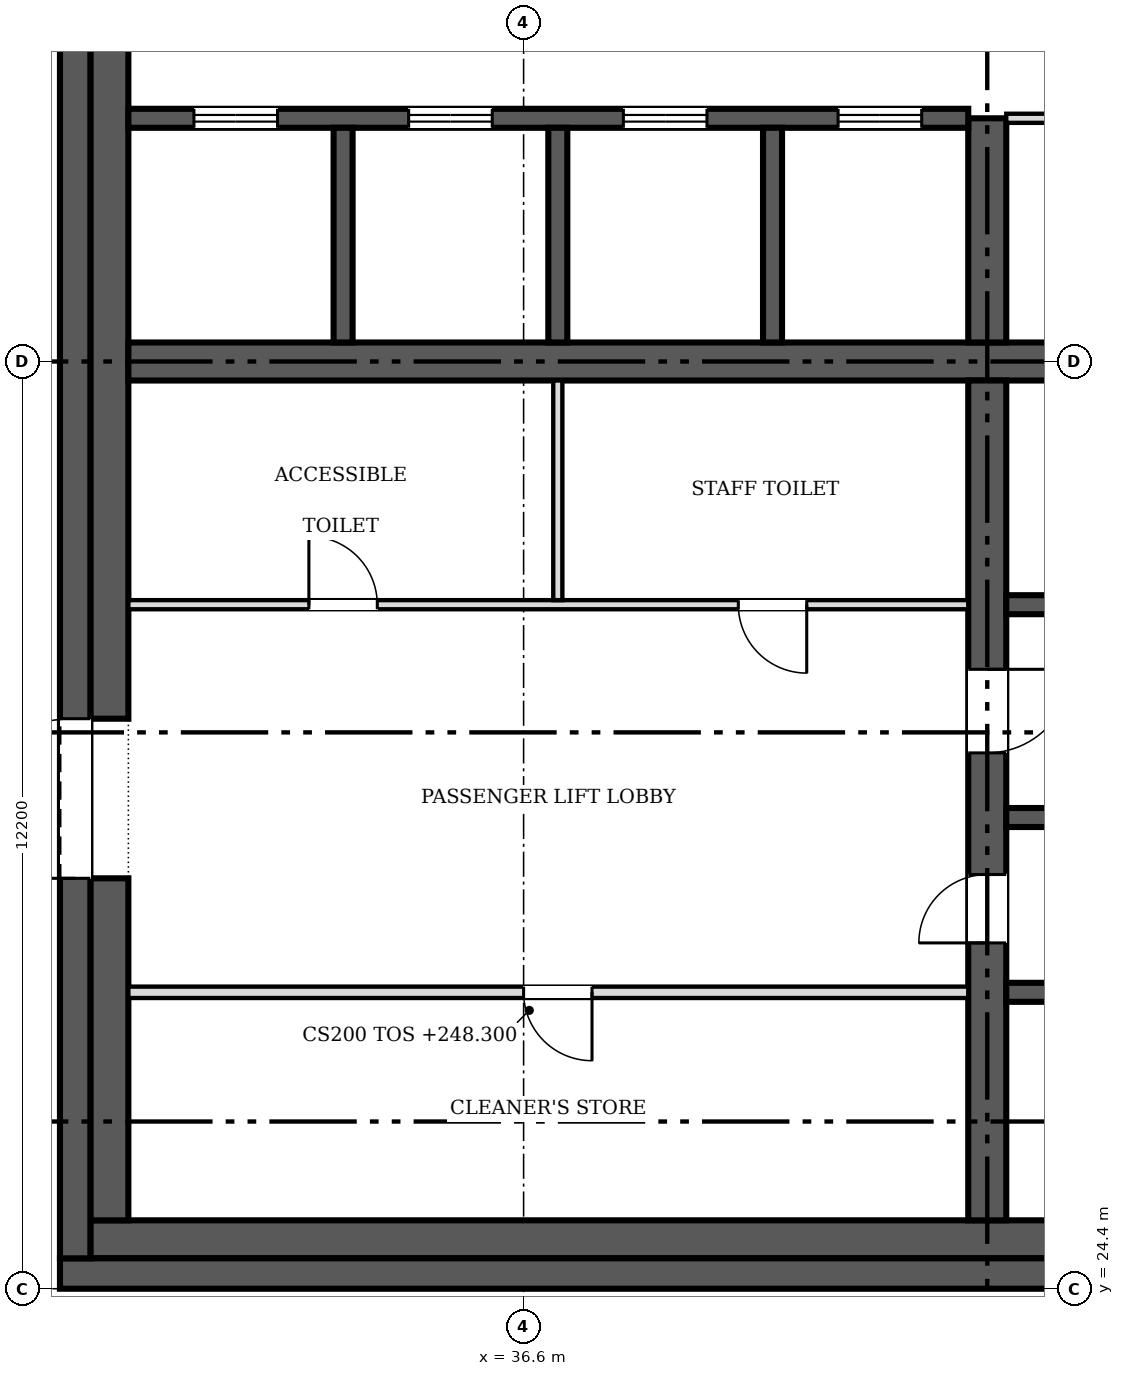
"""IFC4 building model, lengths in metres.
Left out: names, types, materials, properties, quantities, classifications, styles, units other than length and angle.
Written with IfcOpenShell. Run it as: python <this file> out.ifc"""

import sys

from ifc_helpers import new_model, si_unit, direction, frame, frame_2d, origin, place, context, subcontext, project, spatial, rectangle, extrude, source, transform, mapped, element, fill, save


model = new_model("IFC4")
c1 = context("Model", 3, precision=1e-05, world=origin(), true_north=direction((0.0, 1.0)))
c2 = subcontext(c1, "Body", "Model", "MODEL_VIEW")
j1 = project(units=[si_unit("LENGTHUNIT", "METRE"), si_unit("PLANEANGLEUNIT", "RADIAN")], contexts=[c1])
p1 = place(None, origin())
s1 = spatial("IfcSite", under=j1, at=p1, CompositionType="ELEMENT")
p2 = place(p1, origin())
s2 = spatial("IfcBuilding", under=s1, at=p2, CompositionType="ELEMENT")
p3 = place(p2, frame((0.0, 0.0, 248.3)))
s3 = spatial("IfcBuildingStorey", under=s2, at=p3, CompositionType="ELEMENT", Elevation=248.3)
p4 = place(p3, frame((54.9, 24.6, 0.0), z_axis=(0.0, 0.0, 1.0), x_axis=(-1.0, 0.0, 0.0)))
e1 = element("IfcWall", 1, at=p4, inside=s3, PredefinedType="SHEAR", context=c2, shape_type="SweptSolid", body=[
    extrude(rectangle(XDim=24.4, YDim=0.4, at=frame_2d((12.2, 0.0))), origin(), (0.0, 0.0, 1.0), 3.8),
])
m1 = source(origin(), c2, "Body", "SweptSolid", [
    extrude(rectangle(XDim=1.2, YDim=2.1, at=frame_2d((0.6, 1.05))), frame((0.0, 0.21, 0.0), z_axis=(0.0, -1.0, 0.0), x_axis=(1.0, 0.0, 0.0)), (0.0, 0.0, 1.0), 0.42),
])
p5 = place(p4, frame((1.5, 0.0, 0.0)))
e2 = element("IfcOpeningElement", 2, at=p5, cuts=e1, PredefinedType="OPENING", context=c2, shape_type="MappedRepresentation", body=[
    mapped(m1, transform((0.0, 0.0, 0.0), scale=1.0)),
])
p6 = place(p3, frame((30.7, 24.8, 0.0), z_axis=(0.0, 0.0, 1.0), x_axis=(0.0, 1.0, 0.0)))
e3 = element("IfcWall", 3, at=p6, inside=s3, PredefinedType="SHEAR", context=c2, shape_type="SweptSolid", body=[
    extrude(rectangle(XDim=23.6, YDim=0.4, at=frame_2d((11.8, 0.0))), origin(), (0.0, 0.0, 1.0), 3.8),
])
m2 = source(origin(), c2, "Body", "SweptSolid", [
    extrude(rectangle(XDim=2.1, YDim=2.4, at=frame_2d((1.05, 1.2))), frame((0.0, 0.21, 0.0), z_axis=(0.0, -1.0, 0.0), x_axis=(1.0, 0.0, 0.0)), (0.0, 0.0, 1.0), 0.42),
])
p7 = place(p6, frame((5.0, 0.0, 0.0)))
e4 = element("IfcOpeningElement", 4, at=p7, cuts=e3, PredefinedType="OPENING", context=c2, shape_type="MappedRepresentation", body=[
    mapped(m2, transform((0.0, 0.0, 0.0), scale=1.0)),
])
p8 = place(p6, frame((16.5, 0.0, 0.0)))
e5 = element("IfcOpeningElement", 5, at=p8, cuts=e3, PredefinedType="OPENING", context=c2, shape_type="MappedRepresentation", body=[
    mapped(m2, transform((0.0, 0.0, 0.0), scale=1.0)),
])
p9 = place(p3, frame((30.9, 25.05, 0.0), z_axis=(0.0, 0.0, 1.0), x_axis=(1.0, 0.0, 0.0)))
e6 = element("IfcWall", 6, at=p9, inside=s3, PredefinedType="SOLIDWALL", context=c2, shape_type="SweptSolid", body=[
    extrude(rectangle(XDim=21.3, YDim=0.5, at=frame_2d((10.65, 0.0))), origin(), (0.0, 0.0, 1.0), 3.8),
])
p10 = place(p3, frame((31.15, 25.3, 0.0), z_axis=(0.0, 0.0, 1.0), x_axis=(0.0, 1.0, 0.0)))
e7 = element("IfcWall", 7, at=p10, inside=s3, PredefinedType="SOLIDWALL", context=c2, shape_type="SweptSolid", body=[
    extrude(rectangle(XDim=4.5, YDim=0.5, at=frame_2d((2.25, 0.0))), origin(), (0.0, 0.0, 1.0), 3.8),
])
p11 = place(p3, frame((31.15, 31.9, 0.0), z_axis=(0.0, 0.0, 1.0), x_axis=(0.0, 1.0, 0.0)))
e8 = element("IfcWall", 8, at=p11, inside=s3, PredefinedType="SOLIDWALL", context=c2, shape_type="SweptSolid", body=[
    extrude(rectangle(XDim=9.4, YDim=0.5, at=frame_2d((4.7, 0.0))), origin(), (0.0, 0.0, 1.0), 3.8),
])
p12 = place(p3, frame((31.4, 36.6, 0.0), z_axis=(0.0, 0.0, 1.0), x_axis=(1.0, 0.0, 0.0)))
e9 = element("IfcWall", 9, at=p12, inside=s3, PredefinedType="SHEAR", context=c2, shape_type="SweptSolid", body=[
    extrude(rectangle(XDim=16.95, YDim=0.5, at=frame_2d((8.475, 0.0))), origin(), (0.0, 0.0, 1.0), 3.8),
])
p13 = place(p3, frame((42.7, 36.35, 0.0), z_axis=(0.0, 0.0, 1.0), x_axis=(0.0, -1.0, 0.0)))
e10 = element("IfcWall", 10, at=p13, inside=s3, PredefinedType="SHEAR", context=c2, shape_type="SweptSolid", body=[
    extrude(rectangle(XDim=11.05, YDim=0.5, at=frame_2d((5.525, 0.0))), origin(), (0.0, 0.0, 1.0), 3.8),
])
m3 = source(origin(), c2, "Body", "SweptSolid", [
    extrude(rectangle(XDim=0.9, YDim=2.1, at=frame_2d((0.45, 1.05))), frame((0.0, 0.26, 0.0), z_axis=(0.0, -1.0, 0.0), x_axis=(1.0, 0.0, 0.0)), (0.0, 0.0, 1.0), 0.52),
])
p14 = place(p13, frame((6.5, 0.0, 0.0)))
e11 = element("IfcOpeningElement", 11, at=p14, cuts=e10, PredefinedType="OPENING", context=c2, shape_type="MappedRepresentation", body=[
    mapped(m3, transform((0.0, 0.0, 0.0), scale=1.0)),
])
m4 = source(origin(), c2, "Body", "SweptSolid", [
    extrude(rectangle(XDim=1.1, YDim=2.1, at=frame_2d((0.55, 1.05))), frame((0.0, 0.26, 0.0), z_axis=(0.0, -1.0, 0.0), x_axis=(1.0, 0.0, 0.0)), (0.0, 0.0, 1.0), 0.52),
])
p15 = place(p13, frame((3.8, 0.0, 0.0)))
e12 = element("IfcOpeningElement", 12, at=p15, cuts=e10, PredefinedType="OPENING", context=c2, shape_type="MappedRepresentation", body=[
    mapped(m4, transform((0.0, 0.0, 0.0), scale=1.0)),
])
p16 = place(p3, frame((42.7, 36.85, 0.0), z_axis=(0.0, 0.0, 1.0), x_axis=(0.0, 1.0, 0.0)))
e13 = element("IfcWall", 13, at=p16, inside=s3, PredefinedType="SHEAR", context=c2, shape_type="SweptSolid", body=[
    extrude(rectangle(XDim=2.95, YDim=0.5, at=frame_2d((1.475, 0.0))), origin(), (0.0, 0.0, 1.0), 3.8),
])
p17 = place(p3, frame((31.4, 39.8, 0.0), z_axis=(0.0, 0.0, 1.0), x_axis=(1.0, 0.0, 0.0)))
e14 = element("IfcWall", 14, at=p17, inside=s3, PredefinedType="SOLIDWALL", context=c2, shape_type="SweptSolid", body=[
    extrude(rectangle(XDim=11.05, YDim=0.25, at=frame_2d((5.525, 0.0))), origin(), (0.0, 0.0, 1.0), 3.8),
])
m5 = source(origin(), c2, "Body", "SweptSolid", [
    extrude(rectangle(XDim=1.1, YDim=2.1, at=frame_2d((0.55, 1.05))), frame((0.0, 0.135, 0.0), z_axis=(0.0, -1.0, 0.0), x_axis=(1.0, 0.0, 0.0)), (0.0, 0.0, 1.0), 0.27),
])
p18 = place(p17, frame((0.863, 0.0, 0.0)))
e15 = element("IfcOpeningElement", 15, at=p18, cuts=e14, PredefinedType="OPENING", context=c2, shape_type="MappedRepresentation", body=[
    mapped(m5, transform((0.0, 0.0, 0.0), scale=1.0)),
])
p19 = place(p17, frame((3.688, 0.0, 0.0)))
e16 = element("IfcOpeningElement", 16, at=p19, cuts=e14, PredefinedType="OPENING", context=c2, shape_type="MappedRepresentation", body=[
    mapped(m5, transform((0.0, 0.0, 0.0), scale=1.0)),
])
p20 = place(p17, frame((6.512, 0.0, 0.0)))
e17 = element("IfcOpeningElement", 17, at=p20, cuts=e14, PredefinedType="OPENING", context=c2, shape_type="MappedRepresentation", body=[
    mapped(m5, transform((0.0, 0.0, 0.0), scale=1.0)),
])
p21 = place(p17, frame((9.337, 0.0, 0.0)))
e18 = element("IfcOpeningElement", 18, at=p21, cuts=e14, PredefinedType="OPENING", context=c2, shape_type="MappedRepresentation", body=[
    mapped(m5, transform((0.0, 0.0, 0.0), scale=1.0)),
])
p22 = place(p3, frame((48.225, 33.4, 0.0), z_axis=(0.0, 0.0, 1.0), x_axis=(-1.0, 0.0, 0.0)))
e19 = element("IfcWall", 19, at=p22, inside=s3, PredefinedType="SOLIDWALL", context=c2, shape_type="SweptSolid", body=[
    extrude(rectangle(XDim=5.275, YDim=0.25, at=frame_2d((2.638, 0.0))), origin(), (0.0, 0.0, 1.0), 3.8),
])
m6 = source(origin(), c2, "Body", "SweptSolid", [
    extrude(rectangle(XDim=1.2, YDim=2.1, at=frame_2d((0.6, 1.05))), frame((0.0, 0.135, 0.0), z_axis=(0.0, -1.0, 0.0), x_axis=(1.0, 0.0, 0.0)), (0.0, 0.0, 1.0), 0.27),
])
p23 = place(p22, frame((3.512, 0.0, 0.0)))
e20 = element("IfcOpeningElement", 20, at=p23, cuts=e19, PredefinedType="OPENING", context=c2, shape_type="MappedRepresentation", body=[
    mapped(m6, transform((0.0, 0.0, 0.0), scale=1.0)),
])
p24 = place(p22, frame((0.688, 0.0, 0.0)))
e21 = element("IfcOpeningElement", 21, at=p24, cuts=e19, PredefinedType="OPENING", context=c2, shape_type="MappedRepresentation", body=[
    mapped(m6, transform((0.0, 0.0, 0.0), scale=1.0)),
])
for number, where, z_axis, x_axis in (
    (22, (42.95, 28.3, 0.0), (0.0, 0.0, 1.0), (1.0, 0.0, 0.0)),
    (23, (42.95, 30.6, 0.0), (0.0, 0.0, 1.0), (1.0, 0.0, 0.0)),
):
    element("IfcWall", number, at=place(p3, frame(where, z_axis=z_axis, x_axis=x_axis)), inside=s3, PredefinedType="SOLIDWALL", context=c2, shape_type="SweptSolid", body=[
        extrude(rectangle(XDim=5.275, YDim=0.25, at=frame_2d((2.638, 0.0))), origin(), (0.0, 0.0, 1.0), 3.8),
    ])
for number, where, z_axis, x_axis in (
    (24, (34.225, 36.85, 0.0), (0.0, 0.0, 1.0), (0.0, 1.0, 0.0)),
    (25, (37.05, 36.85, 0.0), (0.0, 0.0, 1.0), (0.0, 1.0, 0.0)),
    (26, (39.875, 36.85, 0.0), (0.0, 0.0, 1.0), (0.0, 1.0, 0.0)),
):
    element("IfcWall", number, at=place(p3, frame(where, z_axis=z_axis, x_axis=x_axis)), inside=s3, PredefinedType="SOLIDWALL", context=c2, shape_type="SweptSolid", body=[
        extrude(rectangle(XDim=2.825, YDim=0.25, at=frame_2d((1.413, 0.0))), origin(), (0.0, 0.0, 1.0), 3.8),
    ])
p25 = place(p3, frame((42.45, 28.3, 0.0), z_axis=(0.0, 0.0, 1.0), x_axis=(-1.0, 0.0, 0.0)))
e27 = element("IfcWall", 27, at=p25, inside=s3, PredefinedType="PARTITIONING", context=c2, shape_type="SweptSolid", body=[
    extrude(rectangle(XDim=11.05, YDim=0.15, at=frame_2d((5.525, 0.0))), origin(), (0.0, 0.0, 1.0), 3.6),
])
m7 = source(origin(), c2, "Body", "SweptSolid", [
    extrude(rectangle(XDim=0.9, YDim=2.1, at=frame_2d((0.45, 1.05))), frame((0.0, 0.085, 0.0), z_axis=(0.0, -1.0, 0.0), x_axis=(1.0, 0.0, 0.0)), (0.0, 0.0, 1.0), 0.17),
])
p26 = place(p25, frame((4.95, 0.0, 0.0)))
e28 = element("IfcOpeningElement", 28, at=p26, cuts=e27, PredefinedType="OPENING", context=c2, shape_type="MappedRepresentation", body=[
    mapped(m7, transform((0.0, 0.0, 0.0), scale=1.0)),
])
p27 = place(p3, frame((31.4, 33.4, 0.0), z_axis=(0.0, 0.0, 1.0), x_axis=(1.0, 0.0, 0.0)))
e29 = element("IfcWall", 29, at=p27, inside=s3, PredefinedType="PARTITIONING", context=c2, shape_type="SweptSolid", body=[
    extrude(rectangle(XDim=11.05, YDim=0.12, at=frame_2d((5.525, 0.0))), origin(), (0.0, 0.0, 1.0), 3.6),
])
m8 = source(origin(), c2, "Body", "SweptSolid", [
    extrude(rectangle(XDim=0.9, YDim=2.1, at=frame_2d((0.45, 1.05))), frame((0.0, 0.07, 0.0), z_axis=(0.0, -1.0, 0.0), x_axis=(1.0, 0.0, 0.0)), (0.0, 0.0, 1.0), 0.14),
])
p28 = place(p27, frame((2.375, 0.0, 0.0)))
e30 = element("IfcOpeningElement", 30, at=p28, cuts=e29, PredefinedType="OPENING", context=c2, shape_type="MappedRepresentation", body=[
    mapped(m8, transform((0.0, 0.0, 0.0), scale=1.0)),
])
p29 = place(p27, frame((8.025, 0.0, 0.0)))
e31 = element("IfcOpeningElement", 31, at=p29, cuts=e29, PredefinedType="OPENING", context=c2, shape_type="MappedRepresentation", body=[
    mapped(m8, transform((0.0, 0.0, 0.0), scale=1.0)),
])
p30 = place(p3, frame((48.225, 39.8, 0.0), z_axis=(0.0, 0.0, 1.0), x_axis=(-1.0, 0.0, 0.0)))
e32 = element("IfcWall", 32, at=p30, inside=s3, PredefinedType="PARTITIONING", context=c2, shape_type="SweptSolid", body=[
    extrude(rectangle(XDim=5.275, YDim=0.12, at=frame_2d((2.638, 0.0))), origin(), (0.0, 0.0, 1.0), 3.6),
])
p31 = place(p30, frame((3.663, 0.0, 0.0)))
e33 = element("IfcOpeningElement", 33, at=p31, cuts=e32, PredefinedType="OPENING", context=c2, shape_type="MappedRepresentation", body=[
    mapped(m8, transform((0.0, 0.0, 0.0), scale=1.0)),
])
p32 = place(p30, frame((0.837, 0.0, 0.0)))
e34 = element("IfcOpeningElement", 34, at=p32, cuts=e32, PredefinedType="OPENING", context=c2, shape_type="MappedRepresentation", body=[
    mapped(m8, transform((0.0, 0.0, 0.0), scale=1.0)),
])
p33 = place(p3, frame((37.05, 33.46, 0.0), z_axis=(0.0, 0.0, 1.0), x_axis=(0.0, 1.0, 0.0)))
e35 = element("IfcWall", 35, at=p33, inside=s3, PredefinedType="PARTITIONING", context=c2, shape_type="SweptSolid", body=[
    extrude(rectangle(XDim=2.89, YDim=0.12, at=frame_2d((1.445, 0.0))), origin(), (0.0, 0.0, 1.0), 3.6),
])
m9 = source(origin(), c2, "Body", "SweptSolid", [
    extrude(rectangle(XDim=2.1, YDim=2.4, at=frame_2d((1.05, 1.2))), frame((0.0, 0.025, 0.0), z_axis=(0.0, -1.0, 0.0), x_axis=(1.0, 0.0, 0.0)), (0.0, 0.0, 1.0), 0.05),
])
p34 = place(p7, origin())
e36 = element("IfcDoor", 36, at=p34, inside=s3, OperationType="DOUBLE_DOOR_SINGLE_SWING", PredefinedType="DOOR", context=c2, shape_type="MappedRepresentation", body=[
    mapped(m9, transform((0.0, 0.0, 0.0), scale=1.0)),
])
fill(e4, e36)
m10 = source(origin(), c2, "Body", "SweptSolid", [
    extrude(rectangle(XDim=0.9, YDim=2.1, at=frame_2d((0.45, 1.05))), frame((0.0, 0.025, 0.0), z_axis=(0.0, -1.0, 0.0), x_axis=(1.0, 0.0, 0.0)), (0.0, 0.0, 1.0), 0.05),
])
p35 = place(p14, origin())
e37 = element("IfcDoor", 37, at=p35, inside=s3, OperationType="SINGLE_SWING_RIGHT", PredefinedType="DOOR", context=c2, shape_type="MappedRepresentation", body=[
    mapped(m10, transform((0.0, 0.0, 0.0), scale=1.0)),
])
fill(e11, e37)
m11 = source(origin(), c2, "Body", "SweptSolid", [
    extrude(rectangle(XDim=1.1, YDim=2.1, at=frame_2d((0.55, 1.05))), frame((0.0, 0.025, 0.0), z_axis=(0.0, -1.0, 0.0), x_axis=(1.0, 0.0, 0.0)), (0.0, 0.0, 1.0), 0.05),
])
p36 = place(p15, origin())
e38 = element("IfcDoor", 38, at=p36, inside=s3, OperationType="SINGLE_SWING_LEFT", PredefinedType="DOOR", context=c2, shape_type="MappedRepresentation", body=[
    mapped(m11, transform((0.0, 0.0, 0.0), scale=1.0)),
])
fill(e12, e38)
p37 = place(p18, origin())
e39 = element("IfcDoor", 39, at=p37, inside=s3, OperationType="DOUBLE_DOOR_SLIDING", PredefinedType="DOOR", context=c2, shape_type="MappedRepresentation", body=[
    mapped(m11, transform((0.0, 0.0, 0.0), scale=1.0)),
])
fill(e15, e39)
p38 = place(p19, origin())
e40 = element("IfcDoor", 40, at=p38, inside=s3, OperationType="DOUBLE_DOOR_SLIDING", PredefinedType="DOOR", context=c2, shape_type="MappedRepresentation", body=[
    mapped(m11, transform((0.0, 0.0, 0.0), scale=1.0)),
])
fill(e16, e40)
p39 = place(p20, origin())
e41 = element("IfcDoor", 41, at=p39, inside=s3, OperationType="DOUBLE_DOOR_SLIDING", PredefinedType="DOOR", context=c2, shape_type="MappedRepresentation", body=[
    mapped(m11, transform((0.0, 0.0, 0.0), scale=1.0)),
])
fill(e17, e41)
p40 = place(p21, origin())
e42 = element("IfcDoor", 42, at=p40, inside=s3, OperationType="DOUBLE_DOOR_SLIDING", PredefinedType="DOOR", context=c2, shape_type="MappedRepresentation", body=[
    mapped(m11, transform((0.0, 0.0, 0.0), scale=1.0)),
])
fill(e18, e42)
p41 = place(p26, origin())
e43 = element("IfcDoor", 43, at=p41, inside=s3, OperationType="SINGLE_SWING_LEFT", PredefinedType="DOOR", context=c2, shape_type="MappedRepresentation", body=[
    mapped(m10, transform((0.0, 0.0, 0.0), scale=1.0)),
])
fill(e28, e43)
p42 = place(p28, origin())
e44 = element("IfcDoor", 44, at=p42, inside=s3, OperationType="SINGLE_SWING_LEFT", PredefinedType="DOOR", context=c2, shape_type="MappedRepresentation", body=[
    mapped(m10, transform((0.0, 0.0, 0.0), scale=1.0)),
])
fill(e30, e44)
p43 = place(p29, origin())
e45 = element("IfcDoor", 45, at=p43, inside=s3, OperationType="SINGLE_SWING_RIGHT", PredefinedType="DOOR", context=c2, shape_type="MappedRepresentation", body=[
    mapped(m10, transform((0.0, 0.0, 0.0), scale=1.0)),
])
fill(e31, e45)
save(model, sys.argv[1])
